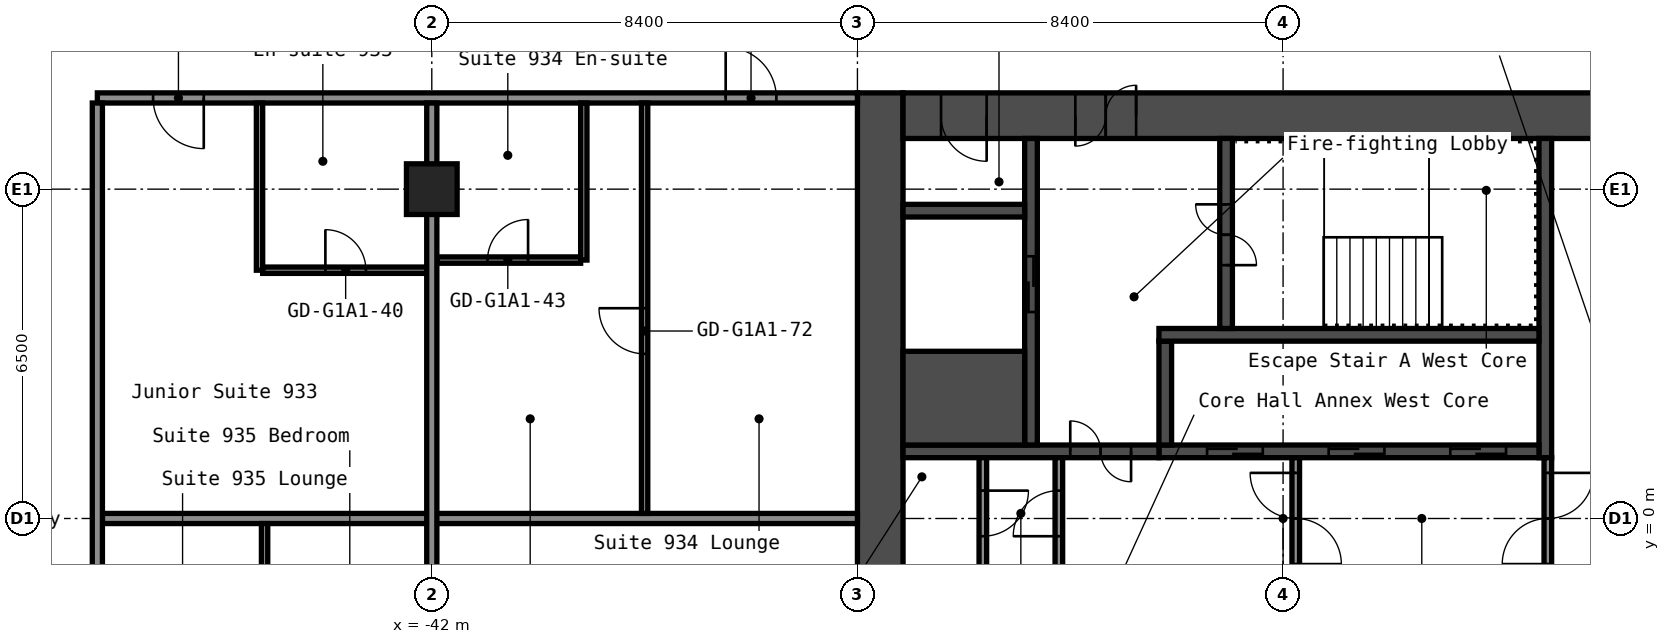
"""IFC4 building model, lengths in metres.
Left out: names, types, materials, properties, quantities, classifications, styles, units other than length and angle.
Written with IfcOpenShell. Run it as: python <this file> out.ifc"""

import sys

from ifc_helpers import new_model, si_unit, direction, frame, frame_2d, origin, origin_2d, place, context, subcontext, project, spatial, rectangle, hollow_rectangle, extrude, element, fill, save


model = new_model("IFC4")
c1 = context("Model", 3, precision=1e-05, world=origin(), true_north=direction((0.0, 1.0)))
c2 = subcontext(c1, "Body", "Model", "MODEL_VIEW")
j1 = project(units=[si_unit("LENGTHUNIT", "METRE"), si_unit("PLANEANGLEUNIT", "RADIAN")], contexts=[c1])
p1 = place(None, origin())
s1 = spatial("IfcSite", under=j1, at=p1, CompositionType="ELEMENT")
p2 = place(p1, origin())
s2 = spatial("IfcBuilding", under=s1, at=p2, CompositionType="ELEMENT")
p3 = place(p2, frame((0.0, 0.0, 35.8)))
s3 = spatial("IfcBuildingStorey", under=s2, at=p3, CompositionType="ELEMENT", Elevation=35.8)
p4 = place(p3, frame((-42.0, 6.5, 0.0), z_axis=(0.0, 0.0, 1.0), x_axis=(1.0, 0.0, 0.0)))
e1 = element("IfcColumn", 1, at=p4, inside=s3, PredefinedType="COLUMN", context=c2, shape_type="SweptSolid", body=[
    extrude(hollow_rectangle(XDim=1.0, YDim=1.0, WallThickness=0.04, at=origin_2d()), origin(), (0.0, 0.0, 1.0), 2.8),
])
p5 = place(p3, frame((-33.15, -8.4, 0.0), z_axis=(0.0, 0.0, 1.0), x_axis=(0.0, 1.0, 0.0)))
e2 = element("IfcWall", 2, at=p5, inside=s3, PredefinedType="SHEAR", context=c2, shape_type="SweptSolid", body=[
    extrude(rectangle(XDim=16.8, YDim=0.9, at=frame_2d((8.4, 0.0))), origin(), (0.0, 0.0, 1.0), 2.8),
])
p6 = place(p3, frame((-32.7, 7.95, 0.0), z_axis=(0.0, 0.0, 1.0), x_axis=(1.0, 0.0, 0.0)))
e3 = element("IfcWall", 3, at=p6, inside=s3, PredefinedType="SHEAR", context=c2, shape_type="SweptSolid", body=[
    extrude(rectangle(XDim=15.0, YDim=0.9, at=frame_2d((7.5, 0.0))), origin(), (0.0, 0.0, 1.0), 2.8),
])
p7 = place(p6, frame((3.4, 0.0, 0.0)))
e4 = element("IfcOpeningElement", 4, at=p7, cuts=e3, PredefinedType="OPENING", context=c2, shape_type="SweptSolid", body=[
    extrude(rectangle(XDim=1.2, YDim=2.1, at=frame_2d((0.6, 1.05))), frame((0.0, 0.46, 0.0), z_axis=(0.0, -1.0, 0.0), x_axis=(1.0, 0.0, 0.0)), (0.0, 0.0, 1.0), 0.92),
])
p8 = place(p6, frame((0.75, 0.0, 0.0)))
e5 = element("IfcOpeningElement", 5, at=p8, cuts=e3, PredefinedType="OPENING", context=c2, shape_type="SweptSolid", body=[
    extrude(rectangle(XDim=0.9, YDim=2.1, at=frame_2d((0.45, 1.05))), frame((0.0, 0.46, 0.0), z_axis=(0.0, -1.0, 0.0), x_axis=(1.0, 0.0, 0.0)), (0.0, 0.0, 1.0), 0.92),
])
p9 = place(p3, frame((-20.025, 1.2, 0.0), z_axis=(0.0, 0.0, 1.0), x_axis=(0.0, 1.0, 0.0)))
e6 = element("IfcWall", 6, at=p9, inside=s3, PredefinedType="SHEAR", context=c2, shape_type="SweptSolid", body=[
    extrude(rectangle(XDim=6.3, YDim=0.25, at=frame_2d((3.15, 0.0))), origin(), (0.0, 0.0, 1.0), 2.8),
])
p10 = place(p3, frame((-27.65, 1.325, 0.0), z_axis=(0.0, 0.0, 1.0), x_axis=(1.0, 0.0, 0.0)))
e7 = element("IfcWall", 7, at=p10, inside=s3, PredefinedType="SHEAR", context=c2, shape_type="SweptSolid", body=[
    extrude(rectangle(XDim=7.5, YDim=0.25, at=frame_2d((3.75, 0.0))), origin(), (0.0, 0.0, 1.0), 2.8),
])
p11 = place(p10, frame((5.75, 0.0, 0.0)))
e8 = element("IfcOpeningElement", 8, at=p11, cuts=e7, PredefinedType="OPENING", context=c2, shape_type="SweptSolid", body=[
    extrude(rectangle(XDim=1.1, YDim=2.1, at=frame_2d((0.55, 1.05))), frame((0.0, 0.135, 0.0), z_axis=(0.0, -1.0, 0.0), x_axis=(1.0, 0.0, 0.0)), (0.0, 0.0, 1.0), 0.27),
])
p12 = place(p10, frame((3.35, 0.0, 0.0)))
e9 = element("IfcOpeningElement", 9, at=p12, cuts=e7, PredefinedType="OPENING", context=c2, shape_type="SweptSolid", body=[
    extrude(rectangle(XDim=1.1, YDim=2.1, at=frame_2d((0.55, 1.05))), frame((0.0, 0.135, 0.0), z_axis=(0.0, -1.0, 0.0), x_axis=(1.0, 0.0, 0.0)), (0.0, 0.0, 1.0), 0.27),
])
p13 = place(p10, frame((0.95, 0.0, 0.0)))
e10 = element("IfcOpeningElement", 10, at=p13, cuts=e7, PredefinedType="OPENING", context=c2, shape_type="SweptSolid", body=[
    extrude(rectangle(XDim=1.1, YDim=2.1, at=frame_2d((0.55, 1.05))), frame((0.0, 0.135, 0.0), z_axis=(0.0, -1.0, 0.0), x_axis=(1.0, 0.0, 0.0)), (0.0, 0.0, 1.0), 0.27),
])
p14 = place(p3, frame((-27.525, 1.45, 0.0), z_axis=(0.0, 0.0, 1.0), x_axis=(0.0, 1.0, 0.0)))
e11 = element("IfcWall", 11, at=p14, inside=s3, PredefinedType="SHEAR", context=c2, shape_type="SweptSolid", body=[
    extrude(rectangle(XDim=2.05, YDim=0.25, at=frame_2d((1.025, 0.0))), origin(), (0.0, 0.0, 1.0), 2.8),
])
p15 = place(p3, frame((-27.65, 3.625, 0.0), z_axis=(0.0, 0.0, 1.0), x_axis=(1.0, 0.0, 0.0)))
e12 = element("IfcWall", 12, at=p15, inside=s3, PredefinedType="SHEAR", context=c2, shape_type="SweptSolid", body=[
    extrude(rectangle(XDim=7.5, YDim=0.25, at=frame_2d((3.75, 0.0))), origin(), (0.0, 0.0, 1.0), 2.8),
])
p16 = place(p3, frame((-26.325, 3.75, 0.0), z_axis=(0.0, 0.0, 1.0), x_axis=(0.0, 1.0, 0.0)))
e13 = element("IfcWall", 13, at=p16, inside=s3, PredefinedType="SHEAR", context=c2, shape_type="SweptSolid", body=[
    extrude(rectangle(XDim=3.75, YDim=0.25, at=frame_2d((1.875, 0.0))), origin(), (0.0, 0.0, 1.0), 2.8),
])
p17 = place(p16, frame((1.25, 0.0, 0.0)))
e14 = element("IfcOpeningElement", 14, at=p17, cuts=e13, PredefinedType="OPENING", context=c2, shape_type="SweptSolid", body=[
    extrude(rectangle(XDim=1.2, YDim=2.1, at=frame_2d((0.6, 1.05))), frame((0.0, 0.135, 0.0), z_axis=(0.0, -1.0, 0.0), x_axis=(1.0, 0.0, 0.0)), (0.0, 0.0, 1.0), 0.27),
])
p18 = place(p3, frame((-32.7, 1.325, 0.0), z_axis=(0.0, 0.0, 1.0), x_axis=(1.0, 0.0, 0.0)))
e15 = element("IfcWall", 15, at=p18, inside=s3, PredefinedType="SHEAR", context=c2, shape_type="SweptSolid", body=[
    extrude(rectangle(XDim=5.05, YDim=0.25, at=frame_2d((2.525, 0.0))), origin(), (0.0, 0.0, 1.0), 2.8),
])
p19 = place(p18, frame((3.3, 0.0, 0.0)))
e16 = element("IfcOpeningElement", 16, at=p19, cuts=e15, PredefinedType="OPENING", context=c2, shape_type="SweptSolid", body=[
    extrude(rectangle(XDim=1.2, YDim=2.1, at=frame_2d((0.6, 1.05))), frame((0.0, 0.135, 0.0), z_axis=(0.0, -1.0, 0.0), x_axis=(1.0, 0.0, 0.0)), (0.0, 0.0, 1.0), 0.27),
])
p20 = place(p3, frame((-30.175, 1.45, 0.0), z_axis=(0.0, 0.0, 1.0), x_axis=(0.0, 1.0, 0.0)))
e17 = element("IfcWall", 17, at=p20, inside=s3, PredefinedType="SHEAR", context=c2, shape_type="SweptSolid", body=[
    extrude(rectangle(XDim=6.05, YDim=0.25, at=frame_2d((3.025, 0.0))), origin(), (0.0, 0.0, 1.0), 2.8),
])
p21 = place(p20, frame((2.625, 0.0, 0.0)))
e18 = element("IfcOpeningElement", 18, at=p21, cuts=e17, PredefinedType="OPENING", context=c2, shape_type="SweptSolid", body=[
    extrude(rectangle(XDim=1.1, YDim=2.1, at=frame_2d((0.55, 1.05))), frame((0.0, 0.135, 0.0), z_axis=(0.0, -1.0, 0.0), x_axis=(1.0, 0.0, 0.0)), (0.0, 0.0, 1.0), 0.27),
])
p22 = place(p3, frame((-32.7, 2.375, 0.0), z_axis=(0.0, 0.0, 1.0), x_axis=(1.0, 0.0, 0.0)))
e19 = element("IfcWall", 19, at=p22, inside=s3, PredefinedType="SHEAR", context=c2, shape_type="SweptSolid", body=[
    extrude(rectangle(XDim=2.4, YDim=1.85, at=frame_2d((1.2, 0.0))), origin(), (0.0, 0.0, 1.0), 2.8),
])
p23 = place(p3, frame((-32.7, 6.075, 0.0), z_axis=(0.0, 0.0, 1.0), x_axis=(1.0, 0.0, 0.0)))
e20 = element("IfcWall", 20, at=p23, inside=s3, PredefinedType="SHEAR", context=c2, shape_type="SweptSolid", body=[
    extrude(rectangle(XDim=2.4, YDim=0.25, at=frame_2d((1.2, 0.0))), origin(), (0.0, 0.0, 1.0), 2.8),
])
p24 = place(p3, frame((-19.975, -1.2, 0.0), z_axis=(0.0, 0.0, 1.0), x_axis=(0.0, 1.0, 0.0)))
e21 = element("IfcWall", 21, at=p24, inside=s3, PredefinedType="PARTITIONING", context=c2, shape_type="SweptSolid", body=[
    extrude(rectangle(XDim=2.4, YDim=0.15, at=frame_2d((1.2, 0.0))), origin(), (0.0, 0.0, 1.0), 2.8),
])
p25 = place(p24, frame((0.3, 0.0, 0.0)))
e22 = element("IfcOpeningElement", 22, at=p25, cuts=e21, PredefinedType="OPENING", context=c2, shape_type="SweptSolid", body=[
    extrude(rectangle(XDim=1.8, YDim=2.1, at=frame_2d((0.9, 1.05))), frame((0.0, 0.085, 0.0), z_axis=(0.0, -1.0, 0.0), x_axis=(1.0, 0.0, 0.0)), (0.0, 0.0, 1.0), 0.17),
])
p26 = place(p3, frame((-24.95, -1.2, 0.0), z_axis=(0.0, 0.0, 1.0), x_axis=(0.0, 1.0, 0.0)))
e23 = element("IfcWall", 23, at=p26, inside=s3, PredefinedType="PARTITIONING", context=c2, shape_type="SweptSolid", body=[
    extrude(rectangle(XDim=2.4, YDim=0.15, at=frame_2d((1.2, 0.0))), origin(), (0.0, 0.0, 1.0), 2.8),
])
p27 = place(p26, frame((0.3, 0.0, 0.0)))
e24 = element("IfcOpeningElement", 24, at=p27, cuts=e23, PredefinedType="OPENING", context=c2, shape_type="SweptSolid", body=[
    extrude(rectangle(XDim=1.8, YDim=2.1, at=frame_2d((0.9, 1.05))), frame((0.0, 0.085, 0.0), z_axis=(0.0, -1.0, 0.0), x_axis=(1.0, 0.0, 0.0)), (0.0, 0.0, 1.0), 0.17),
])
p28 = place(p3, frame((-29.625, -1.15, 0.0), z_axis=(0.0, 0.0, 1.0), x_axis=(0.0, 1.0, 0.0)))
e25 = element("IfcWall", 25, at=p28, inside=s3, PredefinedType="PARTITIONING", context=c2, shape_type="SweptSolid", body=[
    extrude(rectangle(XDim=2.35, YDim=0.15, at=frame_2d((1.175, 0.0))), origin(), (0.0, 0.0, 1.0), 2.8),
])
p29 = place(p28, frame((0.8, 0.0, 0.0)))
e26 = element("IfcOpeningElement", 26, at=p29, cuts=e25, PredefinedType="OPENING", context=c2, shape_type="SweptSolid", body=[
    extrude(rectangle(XDim=0.9, YDim=2.1, at=frame_2d((0.45, 1.05))), frame((0.0, 0.085, 0.0), z_axis=(0.0, -1.0, 0.0), x_axis=(1.0, 0.0, 0.0)), (0.0, 0.0, 1.0), 0.17),
])
p30 = place(p3, frame((-31.125, -1.0, 0.0), z_axis=(0.0, 0.0, 1.0), x_axis=(0.0, 1.0, 0.0)))
e27 = element("IfcWall", 27, at=p30, inside=s3, PredefinedType="PARTITIONING", context=c2, shape_type="SweptSolid", body=[
    extrude(rectangle(XDim=2.2, YDim=0.15, at=frame_2d((1.1, 0.0))), origin(), (0.0, 0.0, 1.0), 2.8),
])
p31 = place(p30, frame((0.65, 0.0, 0.0)))
e28 = element("IfcOpeningElement", 28, at=p31, cuts=e27, PredefinedType="OPENING", context=c2, shape_type="SweptSolid", body=[
    extrude(rectangle(XDim=0.9, YDim=2.1, at=frame_2d((0.45, 1.05))), frame((0.0, 0.085, 0.0), z_axis=(0.0, -1.0, 0.0), x_axis=(1.0, 0.0, 0.0)), (0.0, 0.0, 1.0), 0.17),
])
p32 = place(p3, frame((-48.5, 0.0, 0.0), z_axis=(0.0, 0.0, 1.0), x_axis=(1.0, 0.0, 0.0)))
e29 = element("IfcWall", 29, at=p32, inside=s3, PredefinedType="PARTITIONING", context=c2, shape_type="SweptSolid", body=[
    extrude(rectangle(XDim=14.9, YDim=0.2, at=frame_2d((7.45, 0.0))), origin(), (0.0, 0.0, 1.0), 2.8),
])
p33 = place(p3, frame((-45.337, 4.9, 0.0), z_axis=(0.0, 0.0, 1.0), x_axis=(1.0, 0.0, 0.0)))
e30 = element("IfcWall", 30, at=p33, inside=s3, PredefinedType="PARTITIONING", context=c2, shape_type="SweptSolid", body=[
    extrude(rectangle(XDim=3.237, YDim=0.125, at=frame_2d((1.619, 0.0))), origin(), (0.0, 0.0, 1.0), 2.8),
])
p34 = place(p33, frame((1.238, 0.0, 0.0)))
e31 = element("IfcOpeningElement", 31, at=p34, cuts=e30, PredefinedType="OPENING", context=c2, shape_type="SweptSolid", body=[
    extrude(rectangle(XDim=0.8, YDim=2.1, at=frame_2d((0.4, 1.05))), frame((0.0, 0.073, 0.0), z_axis=(0.0, -1.0, 0.0), x_axis=(1.0, 0.0, 0.0)), (0.0, 0.0, 1.0), 0.145),
])
p35 = place(p3, frame((-41.9, 5.1, 0.0), z_axis=(0.0, 0.0, 1.0), x_axis=(1.0, 0.0, 0.0)))
e32 = element("IfcWall", 32, at=p35, inside=s3, PredefinedType="PARTITIONING", context=c2, shape_type="SweptSolid", body=[
    extrude(rectangle(XDim=2.837, YDim=0.125, at=frame_2d((1.419, 0.0))), origin(), (0.0, 0.0, 1.0), 2.8),
])
p36 = place(p35, frame((1.0, 0.0, 0.0)))
e33 = element("IfcOpeningElement", 33, at=p36, cuts=e32, PredefinedType="OPENING", context=c2, shape_type="SweptSolid", body=[
    extrude(rectangle(XDim=0.8, YDim=2.1, at=frame_2d((0.4, 1.05))), frame((0.0, 0.073, 0.0), z_axis=(0.0, -1.0, 0.0), x_axis=(1.0, 0.0, 0.0)), (0.0, 0.0, 1.0), 0.145),
])
p37 = place(p3, frame((-48.6, 8.3, 0.0), z_axis=(0.0, 0.0, 1.0), x_axis=(1.0, 0.0, 0.0)))
e34 = element("IfcWall", 34, at=p37, inside=s3, PredefinedType="PARTITIONING", context=c2, shape_type="SweptSolid", body=[
    extrude(rectangle(XDim=15.0, YDim=0.2, at=frame_2d((7.5, 0.0))), origin(), (0.0, 0.0, 1.0), 2.8),
])
p38 = place(p37, frame((1.1, 0.0, 0.0)))
e35 = element("IfcOpeningElement", 35, at=p38, cuts=e34, PredefinedType="OPENING", context=c2, shape_type="SweptSolid", body=[
    extrude(rectangle(XDim=1.0, YDim=2.1, at=frame_2d((0.5, 1.05))), frame((0.0, 0.11, 0.0), z_axis=(0.0, -1.0, 0.0), x_axis=(1.0, 0.0, 0.0)), (0.0, 0.0, 1.0), 0.22),
])
p39 = place(p37, frame((12.4, 0.0, 0.0)))
e36 = element("IfcOpeningElement", 36, at=p39, cuts=e34, PredefinedType="OPENING", context=c2, shape_type="SweptSolid", body=[
    extrude(rectangle(XDim=1.0, YDim=2.1, at=frame_2d((0.5, 1.05))), frame((0.0, 0.11, 0.0), z_axis=(0.0, -1.0, 0.0), x_axis=(1.0, 0.0, 0.0)), (0.0, 0.0, 1.0), 0.22),
])
p40 = place(p3, frame((-48.6, -8.2, 0.0), z_axis=(0.0, 0.0, 1.0), x_axis=(0.0, 1.0, 0.0)))
e37 = element("IfcWall", 37, at=p40, inside=s3, PredefinedType="PARTITIONING", context=c2, shape_type="SweptSolid", body=[
    extrude(rectangle(XDim=16.4, YDim=0.2, at=frame_2d((8.2, 0.0))), origin(), (0.0, 0.0, 1.0), 2.8),
])
p41 = place(p3, frame((-45.4, 4.9, 0.0), z_axis=(0.0, 0.0, 1.0), x_axis=(0.0, 1.0, 0.0)))
e38 = element("IfcWall", 38, at=p41, inside=s3, PredefinedType="PARTITIONING", context=c2, shape_type="SweptSolid", body=[
    extrude(rectangle(XDim=3.3, YDim=0.125, at=frame_2d((1.65, 0.0))), origin(), (0.0, 0.0, 1.0), 2.8),
])
p42 = place(p3, frame((-45.3, -8.2, 0.0), z_axis=(0.0, 0.0, 1.0), x_axis=(0.0, 1.0, 0.0)))
e39 = element("IfcWall", 39, at=p42, inside=s3, PredefinedType="PARTITIONING", context=c2, shape_type="SweptSolid", body=[
    extrude(rectangle(XDim=8.1, YDim=0.125, at=frame_2d((4.05, 0.0))), origin(), (0.0, 0.0, 1.0), 2.8),
])
p43 = place(p42, frame((4.05, 0.0, 0.0)))
e40 = element("IfcOpeningElement", 40, at=p43, cuts=e39, PredefinedType="OPENING", context=c2, shape_type="SweptSolid", body=[
    extrude(rectangle(XDim=0.9, YDim=2.1, at=frame_2d((0.45, 1.05))), frame((0.0, 0.073, 0.0), z_axis=(0.0, -1.0, 0.0), x_axis=(1.0, 0.0, 0.0)), (0.0, 0.0, 1.0), 0.145),
])
p44 = place(p3, frame((-42.0, -8.2, 0.0), z_axis=(0.0, 0.0, 1.0), x_axis=(0.0, 1.0, 0.0)))
e41 = element("IfcWall", 41, at=p44, inside=s3, PredefinedType="PARTITIONING", context=c2, shape_type="SweptSolid", body=[
    extrude(rectangle(XDim=16.4, YDim=0.2, at=frame_2d((8.2, 0.0))), origin(), (0.0, 0.0, 1.0), 2.8),
])
p45 = place(p3, frame((-39.0, 5.1, 0.0), z_axis=(0.0, 0.0, 1.0), x_axis=(0.0, 1.0, 0.0)))
e42 = element("IfcWall", 42, at=p45, inside=s3, PredefinedType="PARTITIONING", context=c2, shape_type="SweptSolid", body=[
    extrude(rectangle(XDim=3.1, YDim=0.125, at=frame_2d((1.55, 0.0))), origin(), (0.0, 0.0, 1.0), 2.8),
])
p46 = place(p3, frame((-37.8, 0.1, 0.0), z_axis=(0.0, 0.0, 1.0), x_axis=(0.0, 1.0, 0.0)))
e43 = element("IfcWall", 43, at=p46, inside=s3, PredefinedType="PARTITIONING", context=c2, shape_type="SweptSolid", body=[
    extrude(rectangle(XDim=8.1, YDim=0.125, at=frame_2d((4.05, 0.0))), origin(), (0.0, 0.0, 1.0), 2.8),
])
p47 = place(p46, frame((3.15, 0.0, 0.0)))
e44 = element("IfcOpeningElement", 44, at=p47, cuts=e43, PredefinedType="OPENING", context=c2, shape_type="SweptSolid", body=[
    extrude(rectangle(XDim=0.9, YDim=2.1, at=frame_2d((0.45, 1.05))), frame((0.0, 0.073, 0.0), z_axis=(0.0, -1.0, 0.0), x_axis=(1.0, 0.0, 0.0)), (0.0, 0.0, 1.0), 0.145),
])
p48 = place(p7, origin())
e45 = element("IfcDoor", 45, at=p48, inside=s3, OperationType="DOUBLE_DOOR_SINGLE_SWING", PredefinedType="DOOR", context=c2, shape_type="SweptSolid", body=[
    extrude(rectangle(XDim=1.2, YDim=2.1, at=frame_2d((0.6, 1.05))), frame((0.0, 0.025, 0.0), z_axis=(0.0, -1.0, 0.0), x_axis=(1.0, 0.0, 0.0)), (0.0, 0.0, 1.0), 0.05),
])
fill(e4, e45)
p49 = place(p8, origin())
e46 = element("IfcDoor", 46, at=p49, inside=s3, OperationType="SINGLE_SWING_RIGHT", PredefinedType="DOOR", context=c2, shape_type="SweptSolid", body=[
    extrude(rectangle(XDim=0.9, YDim=2.1, at=frame_2d((0.45, 1.05))), frame((0.0, 0.025, 0.0), z_axis=(0.0, -1.0, 0.0), x_axis=(1.0, 0.0, 0.0)), (0.0, 0.0, 1.0), 0.05),
])
fill(e5, e46)
p50 = place(p17, origin())
e47 = element("IfcDoor", 47, at=p50, inside=s3, OperationType="DOUBLE_DOOR_SINGLE_SWING", PredefinedType="DOOR", context=c2, shape_type="SweptSolid", body=[
    extrude(rectangle(XDim=1.2, YDim=2.1, at=frame_2d((0.6, 1.05))), frame((0.0, 0.025, 0.0), z_axis=(0.0, -1.0, 0.0), x_axis=(1.0, 0.0, 0.0)), (0.0, 0.0, 1.0), 0.05),
])
fill(e14, e47)
p51 = place(p19, origin())
e48 = element("IfcDoor", 48, at=p51, inside=s3, OperationType="DOUBLE_DOOR_SINGLE_SWING", PredefinedType="DOOR", context=c2, shape_type="SweptSolid", body=[
    extrude(rectangle(XDim=1.2, YDim=2.1, at=frame_2d((0.6, 1.05))), frame((0.0, 0.025, 0.0), z_axis=(0.0, -1.0, 0.0), x_axis=(1.0, 0.0, 0.0)), (0.0, 0.0, 1.0), 0.05),
])
fill(e16, e48)
p52 = place(p25, origin())
e49 = element("IfcDoor", 49, at=p52, inside=s3, OperationType="DOUBLE_DOOR_SINGLE_SWING", PredefinedType="DOOR", context=c2, shape_type="SweptSolid", body=[
    extrude(rectangle(XDim=1.8, YDim=2.1, at=frame_2d((0.9, 1.05))), frame((0.0, 0.025, 0.0), z_axis=(0.0, -1.0, 0.0), x_axis=(1.0, 0.0, 0.0)), (0.0, 0.0, 1.0), 0.05),
])
fill(e22, e49)
p53 = place(p27, origin())
e50 = element("IfcDoor", 50, at=p53, inside=s3, OperationType="DOUBLE_DOOR_SINGLE_SWING", PredefinedType="DOOR", context=c2, shape_type="SweptSolid", body=[
    extrude(rectangle(XDim=1.8, YDim=2.1, at=frame_2d((0.9, 1.05))), frame((0.0, 0.025, 0.0), z_axis=(0.0, -1.0, 0.0), x_axis=(1.0, 0.0, 0.0)), (0.0, 0.0, 1.0), 0.05),
])
fill(e24, e50)
p54 = place(p29, origin())
e51 = element("IfcDoor", 51, at=p54, inside=s3, OperationType="SINGLE_SWING_RIGHT", PredefinedType="DOOR", context=c2, shape_type="SweptSolid", body=[
    extrude(rectangle(XDim=0.9, YDim=2.1, at=frame_2d((0.45, 1.05))), frame((0.0, 0.025, 0.0), z_axis=(0.0, -1.0, 0.0), x_axis=(1.0, 0.0, 0.0)), (0.0, 0.0, 1.0), 0.05),
])
fill(e26, e51)
p55 = place(p31, origin())
e52 = element("IfcDoor", 52, at=p55, inside=s3, OperationType="SINGLE_SWING_RIGHT", PredefinedType="DOOR", context=c2, shape_type="SweptSolid", body=[
    extrude(rectangle(XDim=0.9, YDim=2.1, at=frame_2d((0.45, 1.05))), frame((0.0, 0.025, 0.0), z_axis=(0.0, -1.0, 0.0), x_axis=(1.0, 0.0, 0.0)), (0.0, 0.0, 1.0), 0.05),
])
fill(e28, e52)
p56 = place(p11, origin())
e53 = element("IfcDoor", 53, at=p56, inside=s3, OperationType="DOUBLE_DOOR_SLIDING", PredefinedType="DOOR", context=c2, shape_type="SweptSolid", body=[
    extrude(rectangle(XDim=1.1, YDim=2.1, at=frame_2d((0.55, 1.05))), frame((0.0, 0.025, 0.0), z_axis=(0.0, -1.0, 0.0), x_axis=(1.0, 0.0, 0.0)), (0.0, 0.0, 1.0), 0.05),
])
fill(e8, e53)
p57 = place(p12, origin())
e54 = element("IfcDoor", 54, at=p57, inside=s3, OperationType="DOUBLE_DOOR_SLIDING", PredefinedType="DOOR", context=c2, shape_type="SweptSolid", body=[
    extrude(rectangle(XDim=1.1, YDim=2.1, at=frame_2d((0.55, 1.05))), frame((0.0, 0.025, 0.0), z_axis=(0.0, -1.0, 0.0), x_axis=(1.0, 0.0, 0.0)), (0.0, 0.0, 1.0), 0.05),
])
fill(e9, e54)
p58 = place(p13, origin())
e55 = element("IfcDoor", 55, at=p58, inside=s3, OperationType="DOUBLE_DOOR_SLIDING", PredefinedType="DOOR", context=c2, shape_type="SweptSolid", body=[
    extrude(rectangle(XDim=1.1, YDim=2.1, at=frame_2d((0.55, 1.05))), frame((0.0, 0.025, 0.0), z_axis=(0.0, -1.0, 0.0), x_axis=(1.0, 0.0, 0.0)), (0.0, 0.0, 1.0), 0.05),
])
fill(e10, e55)
p59 = place(p21, origin())
e56 = element("IfcDoor", 56, at=p59, inside=s3, OperationType="DOUBLE_DOOR_SLIDING", PredefinedType="DOOR", context=c2, shape_type="SweptSolid", body=[
    extrude(rectangle(XDim=1.1, YDim=2.1, at=frame_2d((0.55, 1.05))), frame((0.0, 0.025, 0.0), z_axis=(0.0, -1.0, 0.0), x_axis=(1.0, 0.0, 0.0)), (0.0, 0.0, 1.0), 0.05),
])
fill(e18, e56)
p60 = place(p34, origin())
e57 = element("IfcDoor", 57, at=p60, inside=s3, OperationType="SINGLE_SWING_RIGHT", PredefinedType="DOOR", context=c2, shape_type="SweptSolid", body=[
    extrude(rectangle(XDim=0.8, YDim=2.1, at=frame_2d((0.4, 1.05))), frame((0.0, 0.025, 0.0), z_axis=(0.0, -1.0, 0.0), x_axis=(1.0, 0.0, 0.0)), (0.0, 0.0, 1.0), 0.05),
])
fill(e31, e57)
p61 = place(p36, origin())
e58 = element("IfcDoor", 58, at=p61, inside=s3, OperationType="SINGLE_SWING_LEFT", PredefinedType="DOOR", context=c2, shape_type="SweptSolid", body=[
    extrude(rectangle(XDim=0.8, YDim=2.1, at=frame_2d((0.4, 1.05))), frame((0.0, 0.025, 0.0), z_axis=(0.0, -1.0, 0.0), x_axis=(1.0, 0.0, 0.0)), (0.0, 0.0, 1.0), 0.05),
])
fill(e33, e58)
p62 = place(p38, origin())
e59 = element("IfcDoor", 59, at=p62, inside=s3, OperationType="SINGLE_SWING_RIGHT", PredefinedType="DOOR", context=c2, shape_type="SweptSolid", body=[
    extrude(rectangle(XDim=1.0, YDim=2.1, at=frame_2d((0.5, 1.05))), frame((0.0, 0.025, 0.0), z_axis=(0.0, -1.0, 0.0), x_axis=(1.0, 0.0, 0.0)), (0.0, 0.0, 1.0), 0.05),
])
fill(e35, e59)
p63 = place(p39, origin())
e60 = element("IfcDoor", 60, at=p63, inside=s3, OperationType="SINGLE_SWING_RIGHT", PredefinedType="DOOR", context=c2, shape_type="SweptSolid", body=[
    extrude(rectangle(XDim=1.0, YDim=2.1, at=frame_2d((0.5, 1.05))), frame((0.0, 0.025, 0.0), z_axis=(0.0, -1.0, 0.0), x_axis=(1.0, 0.0, 0.0)), (0.0, 0.0, 1.0), 0.05),
])
fill(e36, e60)
p64 = place(p47, origin())
e61 = element("IfcDoor", 61, at=p64, inside=s3, OperationType="SINGLE_SWING_LEFT", PredefinedType="DOOR", context=c2, shape_type="SweptSolid", body=[
    extrude(rectangle(XDim=0.9, YDim=2.1, at=frame_2d((0.45, 1.05))), frame((0.0, 0.025, 0.0), z_axis=(0.0, -1.0, 0.0), x_axis=(1.0, 0.0, 0.0)), (0.0, 0.0, 1.0), 0.05),
])
fill(e44, e61)
save(model, sys.argv[1])
